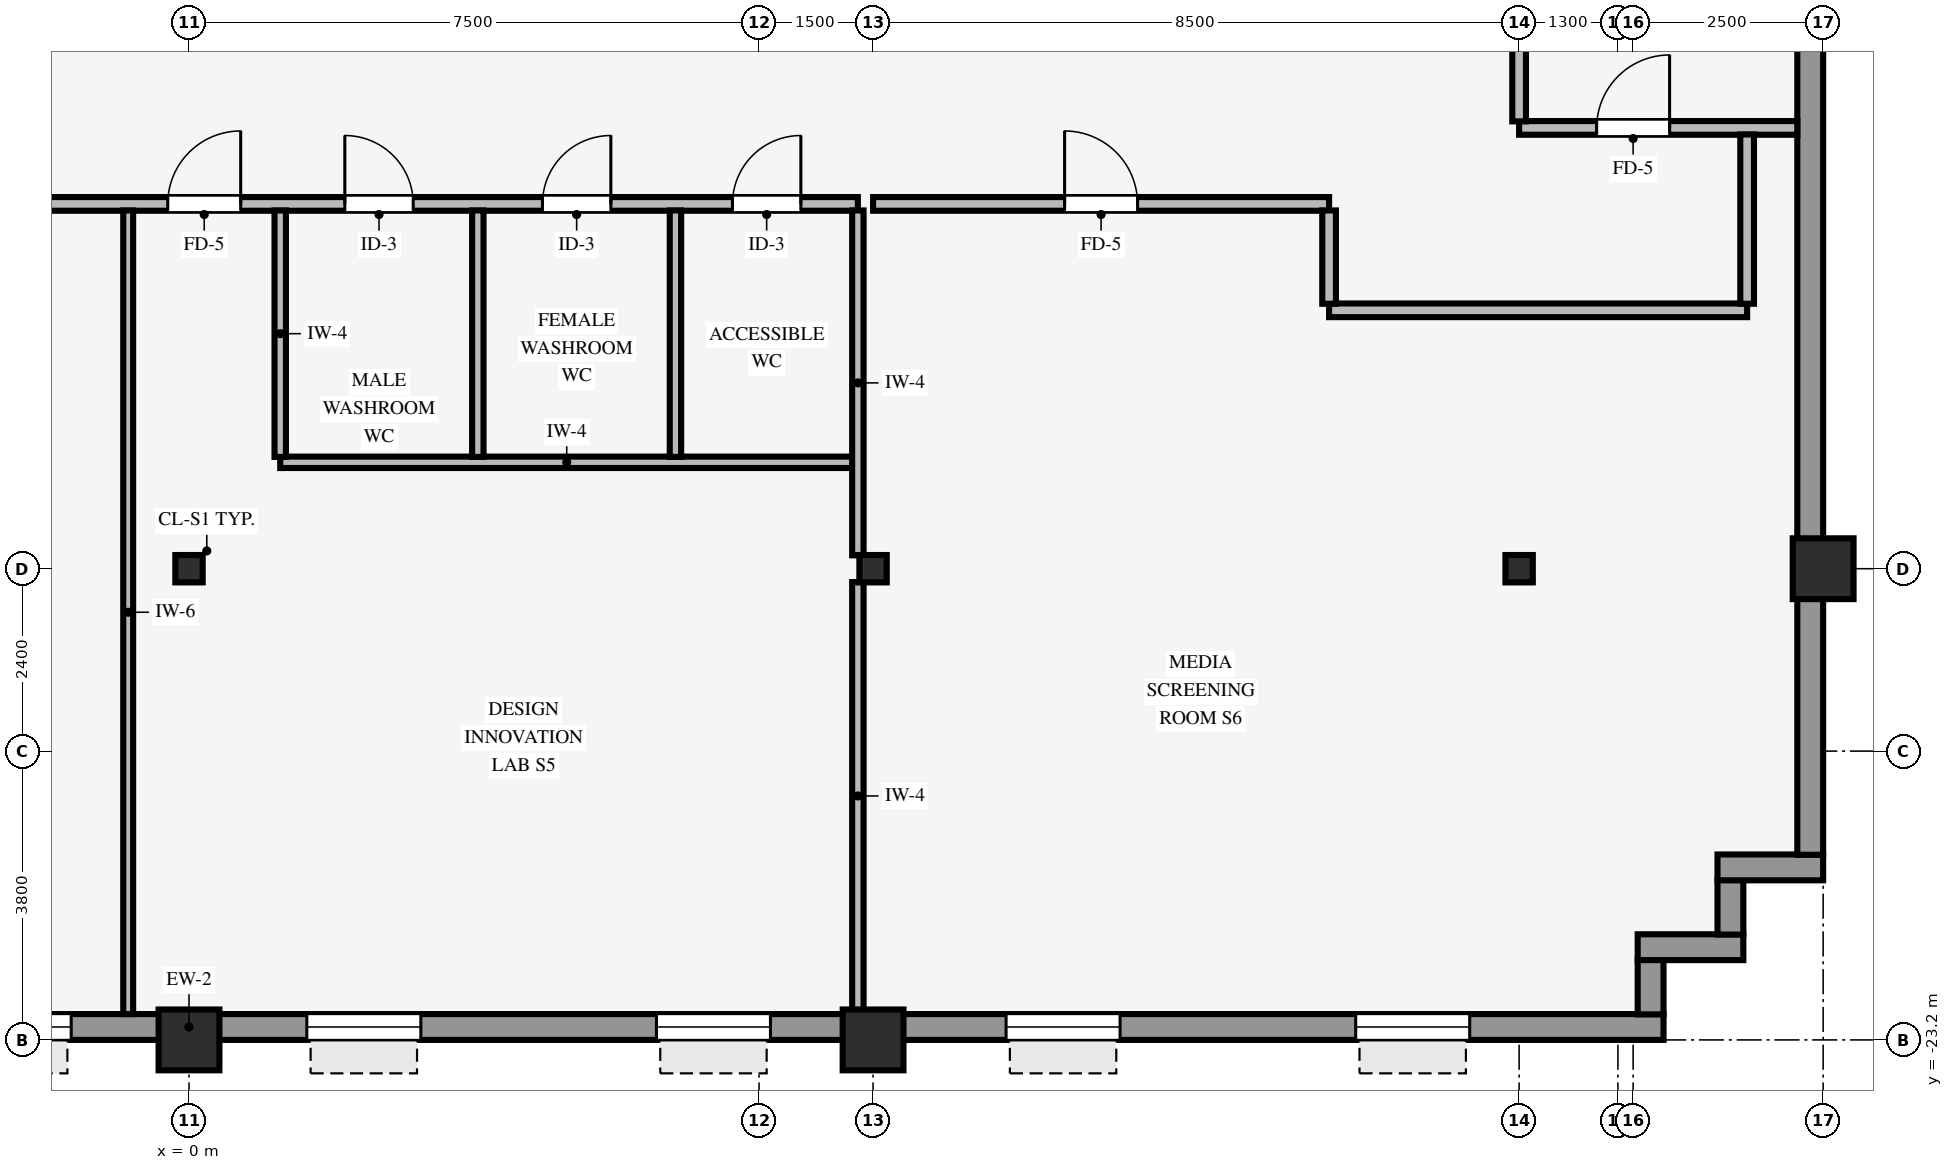
"""IFC4 building model, lengths in metres.
Left out: names, types, materials, properties, quantities, classifications, styles, units other than length and angle.
Written with IfcOpenShell. Run it as: python <this file> out.ifc"""

import sys

from ifc_helpers import new_model, si_unit, direction, frame, frame_2d, origin, origin_2d, place, context, subcontext, project, spatial, rectangle, hollow_rectangle, i_section, extrude, source, transform, mapped, element, fill, save


model = new_model("IFC4")
c1 = context("Model", 3, precision=1e-05, world=origin(), true_north=direction((0.0, 1.0)))
c2 = subcontext(c1, "Body", "Model", "MODEL_VIEW")
j1 = project(units=[si_unit("LENGTHUNIT", "METRE"), si_unit("PLANEANGLEUNIT", "RADIAN")], contexts=[c1])
p1 = place(None, origin())
s1 = spatial("IfcSite", under=j1, at=p1, CompositionType="ELEMENT")
p2 = place(p1, origin())
s2 = spatial("IfcBuilding", under=s1, at=p2, CompositionType="ELEMENT")
p3 = place(p2, frame((0.0, 0.0, 60.45)))
s3 = spatial("IfcBuildingStorey", under=s2, at=p3, CompositionType="ELEMENT", Elevation=60.45)
for number, where, z_axis, x_axis in (
    (1, (21.5, -17.0, 0.0), (0.0, 0.0, 1.0), (1.0, 0.0, 0.0)),
    (2, (0.0, -23.2, 0.0), (0.0, 0.0, 1.0), (1.0, 0.0, 0.0)),
    (3, (9.0, -23.2, 0.0), (0.0, 0.0, 1.0), (1.0, 0.0, 0.0)),
):
    element("IfcColumn", number, at=place(p3, frame(where, z_axis=z_axis, x_axis=x_axis)), inside=s3, PredefinedType="COLUMN", context=c2, shape_type="SweptSolid", body=[
        extrude(hollow_rectangle(XDim=0.8, YDim=0.8, WallThickness=0.055, InnerFilletRadius=0.055, OuterFilletRadius=0.11, at=origin_2d()), origin(), (0.0, 0.0, 1.0), 3.37),
    ])
for number, where, z_axis, x_axis in (
    (4, (0.0, -17.0, 0.0), (0.0, 0.0, 1.0), (1.0, 0.0, 0.0)),
    (5, (9.0, -17.0, 0.0), (0.0, 0.0, 1.0), (1.0, 0.0, 0.0)),
    (6, (17.5, -17.0, 0.0), (0.0, 0.0, 1.0), (1.0, 0.0, 0.0)),
):
    element("IfcColumn", number, at=place(p3, frame(where, z_axis=z_axis, x_axis=x_axis)), inside=s3, PredefinedType="COLUMN", context=c2, shape_type="SweptSolid", body=[
        extrude(i_section(OverallWidth=0.36, OverallDepth=0.36, WebThickness=0.021, FlangeThickness=0.021, FilletRadius=0.018, at=origin_2d()), origin(), (0.0, 0.0, 1.0), 3.37),
    ])
p4 = place(p3, frame((-19.4, -23.03, 0.0), z_axis=(0.0, 0.0, 1.0), x_axis=(1.0, 0.0, 0.0)))
e7 = element("IfcWall", 7, at=p4, inside=s3, PredefinedType="STANDARD", context=c2, shape_type="SweptSolid", body=[
    extrude(rectangle(XDim=38.8, YDim=0.34, at=frame_2d((19.4, 0.0))), origin(), (0.0, 0.0, 1.0), 2.705),
])
p5 = place(p4, frame((2.55, 0.0, 0.8)))
e8 = element("IfcOpeningElement", 8, at=p5, cuts=e7, PredefinedType="OPENING", context=c2, shape_type="SweptSolid", body=[
    extrude(rectangle(XDim=1.5, YDim=1.6, at=frame_2d((0.75, 0.8))), frame((0.0, 0.18, 0.0), z_axis=(0.0, -1.0, 0.0), x_axis=(1.0, 0.0, 0.0)), (0.0, 0.0, 1.0), 0.36),
])
p6 = place(p4, frame((6.25, 0.0, 0.8)))
e9 = element("IfcOpeningElement", 9, at=p6, cuts=e7, PredefinedType="OPENING", context=c2, shape_type="SweptSolid", body=[
    extrude(rectangle(XDim=1.5, YDim=1.6, at=frame_2d((0.75, 0.8))), frame((0.0, 0.18, 0.0), z_axis=(0.0, -1.0, 0.0), x_axis=(1.0, 0.0, 0.0)), (0.0, 0.0, 1.0), 0.36),
])
p7 = place(p4, frame((12.65, 0.0, 0.8)))
e10 = element("IfcOpeningElement", 10, at=p7, cuts=e7, PredefinedType="OPENING", context=c2, shape_type="SweptSolid", body=[
    extrude(rectangle(XDim=1.5, YDim=1.6, at=frame_2d((0.75, 0.8))), frame((0.0, 0.18, 0.0), z_axis=(0.0, -1.0, 0.0), x_axis=(1.0, 0.0, 0.0)), (0.0, 0.0, 1.0), 0.36),
])
p8 = place(p4, frame((16.35, 0.0, 0.8)))
e11 = element("IfcOpeningElement", 11, at=p8, cuts=e7, PredefinedType="OPENING", context=c2, shape_type="SweptSolid", body=[
    extrude(rectangle(XDim=1.5, YDim=1.6, at=frame_2d((0.75, 0.8))), frame((0.0, 0.18, 0.0), z_axis=(0.0, -1.0, 0.0), x_axis=(1.0, 0.0, 0.0)), (0.0, 0.0, 1.0), 0.36),
])
p9 = place(p4, frame((20.95, 0.0, 0.8)))
e12 = element("IfcOpeningElement", 12, at=p9, cuts=e7, PredefinedType="OPENING", context=c2, shape_type="SweptSolid", body=[
    extrude(rectangle(XDim=1.5, YDim=1.6, at=frame_2d((0.75, 0.8))), frame((0.0, 0.18, 0.0), z_axis=(0.0, -1.0, 0.0), x_axis=(1.0, 0.0, 0.0)), (0.0, 0.0, 1.0), 0.36),
])
p10 = place(p4, frame((25.55, 0.0, 0.8)))
e13 = element("IfcOpeningElement", 13, at=p10, cuts=e7, PredefinedType="OPENING", context=c2, shape_type="SweptSolid", body=[
    extrude(rectangle(XDim=1.5, YDim=1.6, at=frame_2d((0.75, 0.8))), frame((0.0, 0.18, 0.0), z_axis=(0.0, -1.0, 0.0), x_axis=(1.0, 0.0, 0.0)), (0.0, 0.0, 1.0), 0.36),
])
p11 = place(p4, frame((30.15, 0.0, 0.8)))
e14 = element("IfcOpeningElement", 14, at=p11, cuts=e7, PredefinedType="OPENING", context=c2, shape_type="SweptSolid", body=[
    extrude(rectangle(XDim=1.5, YDim=1.6, at=frame_2d((0.75, 0.8))), frame((0.0, 0.18, 0.0), z_axis=(0.0, -1.0, 0.0), x_axis=(1.0, 0.0, 0.0)), (0.0, 0.0, 1.0), 0.36),
])
p12 = place(p4, frame((34.75, 0.0, 0.8)))
e15 = element("IfcOpeningElement", 15, at=p12, cuts=e7, PredefinedType="OPENING", context=c2, shape_type="SweptSolid", body=[
    extrude(rectangle(XDim=1.5, YDim=1.6, at=frame_2d((0.75, 0.8))), frame((0.0, 0.18, 0.0), z_axis=(0.0, -1.0, 0.0), x_axis=(1.0, 0.0, 0.0)), (0.0, 0.0, 1.0), 0.36),
])
p13 = place(p3, frame((19.23, -22.864, 0.0), z_axis=(0.0, 0.0, 1.0), x_axis=(0.0, 1.0, 0.0)))
e16 = element("IfcWall", 16, at=p13, inside=s3, PredefinedType="STANDARD", context=c2, shape_type="SweptSolid", body=[
    extrude(rectangle(XDim=0.718, YDim=0.34, at=frame_2d((0.359, 0.0))), origin(), (0.0, 0.0, 1.0), 3.36),
])
p14 = place(p3, frame((19.06, -21.98, 0.0), z_axis=(0.0, 0.0, 1.0), x_axis=(1.0, 0.0, 0.0)))
e17 = element("IfcWall", 17, at=p14, inside=s3, PredefinedType="STANDARD", context=c2, shape_type="SweptSolid", body=[
    extrude(rectangle(XDim=1.39, YDim=0.34, at=frame_2d((0.695, 0.0))), origin(), (0.0, 0.0, 1.0), 3.36),
])
p15 = place(p3, frame((20.28, -21.814, 0.0), z_axis=(0.0, 0.0, 1.0), x_axis=(0.0, 1.0, 0.0)))
e18 = element("IfcWall", 18, at=p15, inside=s3, PredefinedType="STANDARD", context=c2, shape_type="SweptSolid", body=[
    extrude(rectangle(XDim=0.718, YDim=0.34, at=frame_2d((0.359, 0.0))), origin(), (0.0, 0.0, 1.0), 3.36),
])
p16 = place(p3, frame((20.11, -20.93, 0.0), z_axis=(0.0, 0.0, 1.0), x_axis=(1.0, 0.0, 0.0)))
e19 = element("IfcWall", 19, at=p16, inside=s3, PredefinedType="STANDARD", context=c2, shape_type="SweptSolid", body=[
    extrude(rectangle(XDim=1.39, YDim=0.34, at=frame_2d((0.695, 0.0))), origin(), (0.0, 0.0, 1.0), 3.36),
])
p17 = place(p3, frame((21.33, -20.764, 0.0), z_axis=(0.0, 0.0, 1.0), x_axis=(0.0, 1.0, 0.0)))
e20 = element("IfcWall", 20, at=p17, inside=s3, PredefinedType="STANDARD", context=c2, shape_type="SweptSolid", body=[
    extrude(rectangle(XDim=41.528, YDim=0.34, at=frame_2d((20.764, 0.0))), origin(), (0.0, 0.0, 1.0), 2.705),
])
p18 = place(p17, frame((12.202, 0.0, 0.8)))
e21 = element("IfcOpeningElement", 21, at=p18, cuts=e20, PredefinedType="OPENING", context=c2, shape_type="SweptSolid", body=[
    extrude(rectangle(XDim=2.3, YDim=1.62, at=frame_2d((1.15, 0.81))), frame((0.0, 0.18, 0.0), z_axis=(0.0, -1.0, 0.0), x_axis=(1.0, 0.0, 0.0)), (0.0, 0.0, 1.0), 0.36),
])
p19 = place(p17, frame((17.144, 0.0, 0.8)))
e22 = element("IfcOpeningElement", 22, at=p19, cuts=e20, PredefinedType="OPENING", context=c2, shape_type="SweptSolid", body=[
    extrude(rectangle(XDim=2.3, YDim=1.62, at=frame_2d((1.15, 0.81))), frame((0.0, 0.18, 0.0), z_axis=(0.0, -1.0, 0.0), x_axis=(1.0, 0.0, 0.0)), (0.0, 0.0, 1.0), 0.36),
])
p20 = place(p17, frame((22.084, 0.0, 0.8)))
e23 = element("IfcOpeningElement", 23, at=p20, cuts=e20, PredefinedType="OPENING", context=c2, shape_type="SweptSolid", body=[
    extrude(rectangle(XDim=2.3, YDim=1.62, at=frame_2d((1.15, 0.81))), frame((0.0, 0.18, 0.0), z_axis=(0.0, -1.0, 0.0), x_axis=(1.0, 0.0, 0.0)), (0.0, 0.0, 1.0), 0.36),
])
p21 = place(p17, frame((27.025, 0.0, 0.8)))
e24 = element("IfcOpeningElement", 24, at=p21, cuts=e20, PredefinedType="OPENING", context=c2, shape_type="SweptSolid", body=[
    extrude(rectangle(XDim=2.3, YDim=1.62, at=frame_2d((1.15, 0.81))), frame((0.0, 0.18, 0.0), z_axis=(0.0, -1.0, 0.0), x_axis=(1.0, 0.0, 0.0)), (0.0, 0.0, 1.0), 0.36),
])
p22 = place(p3, frame((1.2, -15.6, 0.0), z_axis=(0.0, 0.0, 1.0), x_axis=(1.0, 0.0, 0.0)))
e25 = element("IfcWall", 25, at=p22, inside=s3, PredefinedType="PARTITIONING", context=c2, shape_type="SweptSolid", body=[
    extrude(rectangle(XDim=7.539, YDim=0.15, at=frame_2d((3.77, 0.0))), origin(), (0.0, 0.0, 1.0), 3.36),
])
p23 = place(p3, frame((15.0, -13.6, 0.0), z_axis=(0.0, 0.0, 1.0), x_axis=(1.0, 0.0, 0.0)))
e26 = element("IfcWall", 26, at=p23, inside=s3, PredefinedType="PARTITIONING", context=c2, shape_type="SweptSolid", body=[
    extrude(rectangle(XDim=5.5, YDim=0.18, at=frame_2d((2.75, 0.0))), origin(), (0.0, 0.0, 1.0), 2.942),
])
p24 = place(p3, frame((-15.0, -12.2, 0.0), z_axis=(0.0, 0.0, 1.0), x_axis=(1.0, 0.0, 0.0)))
e27 = element("IfcWall", 27, at=p24, inside=s3, PredefinedType="PARTITIONING", context=c2, shape_type="SweptSolid", body=[
    extrude(rectangle(XDim=23.8, YDim=0.18, at=frame_2d((11.9, 0.0))), origin(), (0.0, 0.0, 1.0), 3.36),
])
p25 = place(p24, frame((9.31, 0.0, 0.0)))
e28 = element("IfcOpeningElement", 28, at=p25, cuts=e27, PredefinedType="OPENING", context=c2, shape_type="SweptSolid", body=[
    extrude(rectangle(XDim=0.96, YDim=2.1, at=frame_2d((0.48, 1.05))), frame((0.0, 0.1, 0.0), z_axis=(0.0, -1.0, 0.0), x_axis=(1.0, 0.0, 0.0)), (0.0, 0.0, 1.0), 0.2),
])
p26 = place(p24, frame((1.715, 0.0, 0.0)))
e29 = element("IfcOpeningElement", 29, at=p26, cuts=e27, PredefinedType="OPENING", context=c2, shape_type="SweptSolid", body=[
    extrude(rectangle(XDim=0.96, YDim=2.1, at=frame_2d((0.48, 1.05))), frame((0.0, 0.1, 0.0), z_axis=(0.0, -1.0, 0.0), x_axis=(1.0, 0.0, 0.0)), (0.0, 0.0, 1.0), 0.2),
])
p27 = place(p24, frame((5.44, 0.0, 0.0)))
e30 = element("IfcOpeningElement", 30, at=p27, cuts=e27, PredefinedType="OPENING", context=c2, shape_type="SweptSolid", body=[
    extrude(rectangle(XDim=0.96, YDim=2.1, at=frame_2d((0.48, 1.05))), frame((0.0, 0.1, 0.0), z_axis=(0.0, -1.0, 0.0), x_axis=(1.0, 0.0, 0.0)), (0.0, 0.0, 1.0), 0.2),
])
p28 = place(p24, frame((19.65, 0.0, 0.0)))
e31 = element("IfcOpeningElement", 31, at=p28, cuts=e27, PredefinedType="OPENING", context=c2, shape_type="SweptSolid", body=[
    extrude(rectangle(XDim=0.9, YDim=2.1, at=frame_2d((0.45, 1.05))), frame((0.0, 0.1, 0.0), z_axis=(0.0, -1.0, 0.0), x_axis=(1.0, 0.0, 0.0)), (0.0, 0.0, 1.0), 0.2),
])
p29 = place(p24, frame((17.05, 0.0, 0.0)))
e32 = element("IfcOpeningElement", 32, at=p29, cuts=e27, PredefinedType="OPENING", context=c2, shape_type="SweptSolid", body=[
    extrude(rectangle(XDim=0.9, YDim=2.1, at=frame_2d((0.45, 1.05))), frame((0.0, 0.1, 0.0), z_axis=(0.0, -1.0, 0.0), x_axis=(1.0, 0.0, 0.0)), (0.0, 0.0, 1.0), 0.2),
])
p30 = place(p24, frame((22.15, 0.0, 0.0)))
e33 = element("IfcOpeningElement", 33, at=p30, cuts=e27, PredefinedType="OPENING", context=c2, shape_type="SweptSolid", body=[
    extrude(rectangle(XDim=0.9, YDim=2.1, at=frame_2d((0.45, 1.05))), frame((0.0, 0.1, 0.0), z_axis=(0.0, -1.0, 0.0), x_axis=(1.0, 0.0, 0.0)), (0.0, 0.0, 1.0), 0.2),
])
p31 = place(p24, frame((14.72, 0.0, 0.0)))
e34 = element("IfcOpeningElement", 34, at=p31, cuts=e27, PredefinedType="OPENING", context=c2, shape_type="SweptSolid", body=[
    extrude(rectangle(XDim=0.96, YDim=2.1, at=frame_2d((0.48, 1.05))), frame((0.0, 0.1, 0.0), z_axis=(0.0, -1.0, 0.0), x_axis=(1.0, 0.0, 0.0)), (0.0, 0.0, 1.0), 0.2),
])
p32 = place(p3, frame((9.0, -12.2, 0.0), z_axis=(0.0, 0.0, 1.0), x_axis=(1.0, 0.0, 0.0)))
e35 = element("IfcWall", 35, at=p32, inside=s3, PredefinedType="PARTITIONING", context=c2, shape_type="SweptSolid", body=[
    extrude(rectangle(XDim=6.0, YDim=0.18, at=frame_2d((3.0, 0.0))), origin(), (0.0, 0.0, 1.0), 3.36),
])
p33 = place(p32, frame((2.52, 0.0, 0.0)))
e36 = element("IfcOpeningElement", 36, at=p33, cuts=e35, PredefinedType="OPENING", context=c2, shape_type="SweptSolid", body=[
    extrude(rectangle(XDim=0.96, YDim=2.1, at=frame_2d((0.48, 1.05))), frame((0.0, 0.1, 0.0), z_axis=(0.0, -1.0, 0.0), x_axis=(1.0, 0.0, 0.0)), (0.0, 0.0, 1.0), 0.2),
])
p34 = place(p3, frame((17.5, -11.2, 0.0), z_axis=(0.0, 0.0, 1.0), x_axis=(1.0, 0.0, 0.0)))
e37 = element("IfcWall", 37, at=p34, inside=s3, PredefinedType="PARTITIONING", context=c2, shape_type="SweptSolid", body=[
    extrude(rectangle(XDim=3.66, YDim=0.18, at=frame_2d((1.83, 0.0))), origin(), (0.0, 0.0, 1.0), 3.36),
])
p35 = place(p34, frame((1.02, 0.0, 0.0)))
e38 = element("IfcOpeningElement", 38, at=p35, cuts=e37, PredefinedType="OPENING", context=c2, shape_type="SweptSolid", body=[
    extrude(rectangle(XDim=0.96, YDim=2.1, at=frame_2d((0.48, 1.05))), frame((0.0, 0.1, 0.0), z_axis=(0.0, -1.0, 0.0), x_axis=(1.0, 0.0, 0.0)), (0.0, 0.0, 1.0), 0.2),
])
p36 = place(p3, frame((-0.8, -22.86, 0.0), z_axis=(0.0, 0.0, 1.0), x_axis=(0.0, 1.0, 0.0)))
e39 = element("IfcWall", 39, at=p36, inside=s3, PredefinedType="PARTITIONING", context=c2, shape_type="SweptSolid", body=[
    extrude(rectangle(XDim=10.574, YDim=0.13, at=frame_2d((5.287, 0.0))), origin(), (0.0, 0.0, 1.0), 3.36),
])
for number, where, z_axis, x_axis in (
    (40, (1.2, -15.529, 0.0), (0.0, 0.0, 1.0), (0.0, 1.0, 0.0)),
    (41, (3.8, -15.529, 0.0), (0.0, 0.0, 1.0), (0.0, 1.0, 0.0)),
    (42, (6.4, -15.529, 0.0), (0.0, 0.0, 1.0), (0.0, 1.0, 0.0)),
):
    element("IfcWall", number, at=place(p3, frame(where, z_axis=z_axis, x_axis=x_axis)), inside=s3, PredefinedType="PARTITIONING", context=c2, shape_type="SweptSolid", body=[
        extrude(rectangle(XDim=3.243, YDim=0.15, at=frame_2d((1.622, 0.0))), origin(), (0.0, 0.0, 1.0), 3.36),
    ])
p37 = place(p3, frame((8.8, -22.804, 0.0), z_axis=(0.0, 0.0, 1.0), x_axis=(0.0, 1.0, 0.0)))
e43 = element("IfcWall", 43, at=p37, inside=s3, PredefinedType="PARTITIONING", context=c2, shape_type="SweptSolid", body=[
    extrude(rectangle(XDim=5.628, YDim=0.15, at=frame_2d((2.814, 0.0))), origin(), (0.0, 0.0, 1.0), 2.738),
])
p38 = place(p3, frame((8.8, -16.824, 0.0), z_axis=(0.0, 0.0, 1.0), x_axis=(0.0, 1.0, 0.0)))
e44 = element("IfcWall", 44, at=p38, inside=s3, PredefinedType="PARTITIONING", context=c2, shape_type="SweptSolid", body=[
    extrude(rectangle(XDim=4.538, YDim=0.15, at=frame_2d((2.269, 0.0))), origin(), (0.0, 0.0, 1.0), 2.738),
])
p39 = place(p3, frame((15.0, -13.514, 0.0), z_axis=(0.0, 0.0, 1.0), x_axis=(0.0, 1.0, 0.0)))
e45 = element("IfcWall", 45, at=p39, inside=s3, PredefinedType="PARTITIONING", context=c2, shape_type="SweptSolid", body=[
    extrude(rectangle(XDim=1.228, YDim=0.18, at=frame_2d((0.614, 0.0))), origin(), (0.0, 0.0, 1.0), 3.36),
])
p40 = place(p3, frame((17.5, -11.114, 0.0), z_axis=(0.0, 0.0, 1.0), x_axis=(0.0, 1.0, 0.0)))
e46 = element("IfcWall", 46, at=p40, inside=s3, PredefinedType="PARTITIONING", context=c2, shape_type="SweptSolid", body=[
    extrude(rectangle(XDim=0.968, YDim=0.18, at=frame_2d((0.484, 0.0))), origin(), (0.0, 0.0, 1.0), 2.738),
])
p41 = place(p3, frame((20.5, -13.514, 0.0), z_axis=(0.0, 0.0, 1.0), x_axis=(0.0, 1.0, 0.0)))
e47 = element("IfcWall", 47, at=p41, inside=s3, PredefinedType="PARTITIONING", context=c2, shape_type="SweptSolid", body=[
    extrude(rectangle(XDim=2.228, YDim=0.18, at=frame_2d((1.114, 0.0))), origin(), (0.0, 0.0, 1.0), 3.36),
])
m1 = source(origin(), c2, "Body", "SweptSolid", [
    extrude(rectangle(XDim=1.5, YDim=1.6, at=frame_2d((0.75, 0.8))), frame((0.0, 0.03, 0.0), z_axis=(0.0, -1.0, 0.0), x_axis=(1.0, 0.0, 0.0)), (0.0, 0.0, 1.0), 0.06),
])
p42 = place(p8, origin())
e48 = element("IfcWindow", 48, at=p42, inside=s3, PartitioningType="SINGLE_PANEL", PredefinedType="WINDOW", context=c2, shape_type="MappedRepresentation", body=[
    mapped(m1, transform((0.0, 0.0, 0.0), scale=1.0)),
])
fill(e11, e48)
p43 = place(p9, origin())
e49 = element("IfcWindow", 49, at=p43, inside=s3, PartitioningType="SINGLE_PANEL", PredefinedType="WINDOW", context=c2, shape_type="MappedRepresentation", body=[
    mapped(m1, transform((0.0, 0.0, 0.0), scale=1.0)),
])
fill(e12, e49)
p44 = place(p10, origin())
e50 = element("IfcWindow", 50, at=p44, inside=s3, PartitioningType="SINGLE_PANEL", PredefinedType="WINDOW", context=c2, shape_type="MappedRepresentation", body=[
    mapped(m1, transform((0.0, 0.0, 0.0), scale=1.0)),
])
fill(e13, e50)
p45 = place(p11, origin())
e51 = element("IfcWindow", 51, at=p45, inside=s3, PartitioningType="SINGLE_PANEL", PredefinedType="WINDOW", context=c2, shape_type="MappedRepresentation", body=[
    mapped(m1, transform((0.0, 0.0, 0.0), scale=1.0)),
])
fill(e14, e51)
p46 = place(p12, origin())
e52 = element("IfcWindow", 52, at=p46, inside=s3, PartitioningType="SINGLE_PANEL", PredefinedType="WINDOW", context=c2, shape_type="MappedRepresentation", body=[
    mapped(m1, transform((0.0, 0.0, 0.0), scale=1.0)),
])
fill(e15, e52)
m2 = source(origin(), c2, "Body", "SweptSolid", [
    extrude(rectangle(XDim=0.96, YDim=2.1, at=frame_2d((0.48, 1.05))), frame((0.0, 0.025, 0.0), z_axis=(0.0, -1.0, 0.0), x_axis=(1.0, 0.0, 0.0)), (0.0, 0.0, 1.0), 0.05),
])
p47 = place(p33, origin())
e53 = element("IfcDoor", 53, at=p47, inside=s3, OperationType="SINGLE_SWING_LEFT", PredefinedType="DOOR", context=c2, shape_type="MappedRepresentation", body=[
    mapped(m2, transform((0.0, 0.0, 0.0), scale=1.0)),
])
fill(e36, e53)
p48 = place(p35, origin())
e54 = element("IfcDoor", 54, at=p48, inside=s3, OperationType="SINGLE_SWING_RIGHT", PredefinedType="DOOR", context=c2, shape_type="MappedRepresentation", body=[
    mapped(m2, transform((0.0, 0.0, 0.0), scale=1.0)),
])
fill(e38, e54)
m3 = source(origin(), c2, "Body", "SweptSolid", [
    extrude(rectangle(XDim=0.9, YDim=2.1, at=frame_2d((0.45, 1.05))), frame((0.0, 0.025, 0.0), z_axis=(0.0, -1.0, 0.0), x_axis=(1.0, 0.0, 0.0)), (0.0, 0.0, 1.0), 0.05),
])
p49 = place(p28, origin())
e55 = element("IfcDoor", 55, at=p49, inside=s3, OperationType="SINGLE_SWING_RIGHT", PredefinedType="DOOR", context=c2, shape_type="MappedRepresentation", body=[
    mapped(m3, transform((0.0, 0.0, 0.0), scale=1.0)),
])
fill(e31, e55)
p50 = place(p29, origin())
e56 = element("IfcDoor", 56, at=p50, inside=s3, OperationType="SINGLE_SWING_LEFT", PredefinedType="DOOR", context=c2, shape_type="MappedRepresentation", body=[
    mapped(m3, transform((0.0, 0.0, 0.0), scale=1.0)),
])
fill(e32, e56)
p51 = place(p30, origin())
e57 = element("IfcDoor", 57, at=p51, inside=s3, OperationType="SINGLE_SWING_RIGHT", PredefinedType="DOOR", context=c2, shape_type="MappedRepresentation", body=[
    mapped(m3, transform((0.0, 0.0, 0.0), scale=1.0)),
])
fill(e33, e57)
p52 = place(p31, origin())
e58 = element("IfcDoor", 58, at=p52, inside=s3, OperationType="SINGLE_SWING_RIGHT", PredefinedType="DOOR", context=c2, shape_type="MappedRepresentation", body=[
    mapped(m2, transform((0.0, 0.0, 0.0), scale=1.0)),
])
fill(e34, e58)
save(model, sys.argv[1])
